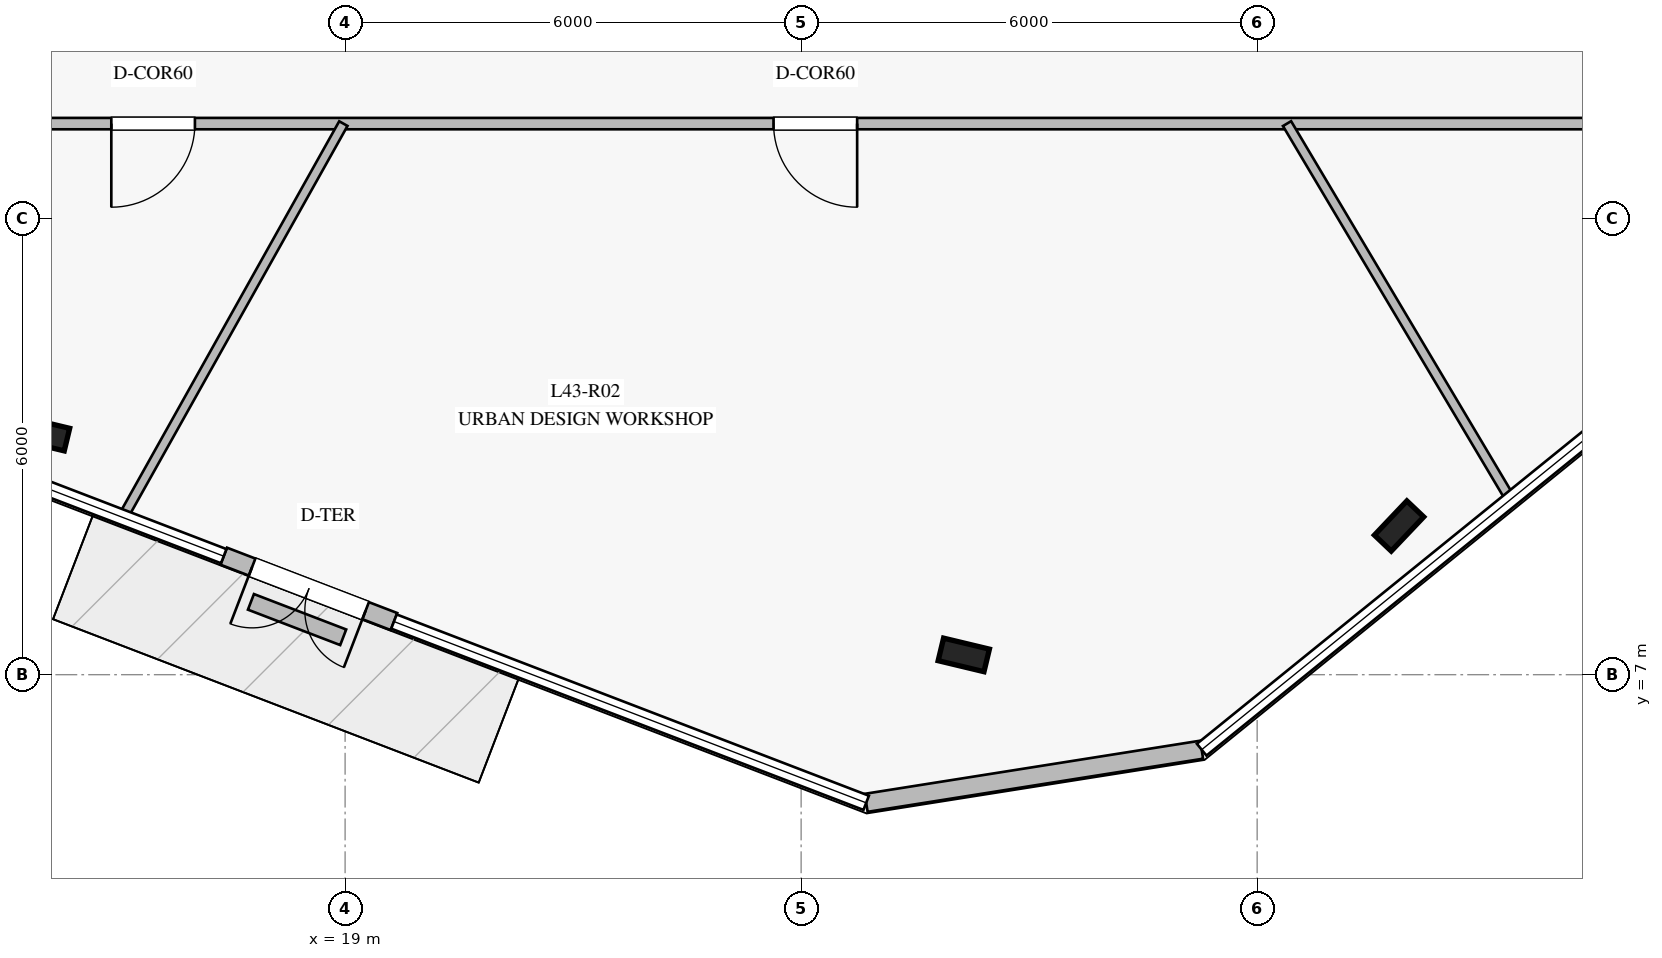
"""IFC4 building model, lengths in metres.
Left out: names, types, materials, properties, quantities, classifications, styles, units other than length and angle.
Written with IfcOpenShell. Run it as: python <this file> out.ifc"""

import sys

from ifc_helpers import new_model, si_unit, direction, frame, frame_2d, origin, origin_2d, place, context, subcontext, project, spatial, rectangle, i_section, extrude, element, fill, save


model = new_model("IFC4")
c1 = context("Model", 3, precision=1e-05, world=origin(), true_north=direction((0.0, 1.0)))
c2 = subcontext(c1, "Body", "Model", "MODEL_VIEW")
j1 = project(units=[si_unit("LENGTHUNIT", "METRE"), si_unit("PLANEANGLEUNIT", "RADIAN")], contexts=[c1])
p1 = place(None, origin())
s1 = spatial("IfcSite", under=j1, at=p1, CompositionType="ELEMENT")
p2 = place(p1, origin())
s2 = spatial("IfcBuilding", under=s1, at=p2, CompositionType="ELEMENT")
p3 = place(p2, frame((0.0, 0.0, 180.8)))
s3 = spatial("IfcBuildingStorey", under=s2, at=p3, CompositionType="ELEMENT", Elevation=180.8)
for number, where, z_axis, x_axis in (
    (1, (15.039, 10.165, 0.0), (0.0, 0.0, 1.0), (-0.972, 0.233, 0.0)),
    (2, (27.14, 7.26, 0.0), (0.0, 0.0, 1.0), (-0.972, 0.233, 0.0)),
    (3, (32.867, 8.956, 0.0), (0.0, 0.0, 1.0), (0.688, 0.725, 0.0)),
):
    element("IfcColumn", number, at=place(p3, frame(where, z_axis=z_axis, x_axis=x_axis)), inside=s3, PredefinedType="COLUMN", context=c2, shape_type="SweptSolid", body=[
        extrude(i_section(OverallWidth=0.305, OverallDepth=0.62, WebThickness=0.021, FlangeThickness=0.04, at=origin_2d()), origin(), (0.0, 0.0, 1.0), 4.0),
    ])
p4 = place(p3, frame((17.403, 8.559, 0.0), z_axis=(0.0, 0.0, 1.0), x_axis=(0.933544764029, -0.358460839638, 0.0)))
e4 = element("IfcWall", 4, at=p4, inside=s3, PredefinedType="STANDARD", context=c2, shape_type="SweptSolid", body=[
    extrude(rectangle(XDim=2.399, YDim=0.24, at=frame_2d((1.2, 0.0))), origin(), (0.0, 0.0, 1.0), 3.78),
])
p5 = place(p4, frame((0.4, 0.0, 0.0)))
e5 = element("IfcOpeningElement", 5, at=p5, cuts=e4, PredefinedType="OPENING", context=c2, shape_type="SweptSolid", body=[
    extrude(rectangle(XDim=1.6, YDim=2.25, at=frame_2d((0.8, 1.125))), frame((0.0, 0.13, 0.0), z_axis=(0.0, -1.0, 0.0), x_axis=(1.0, 0.0, 0.0)), (0.0, 0.0, 1.0), 0.26),
])
p6 = place(p3, frame((25.856, 5.314, 0.0), z_axis=(0.0, 0.0, 1.0), x_axis=(0.987693325828, 0.156402986275, 0.0)))
e6 = element("IfcWall", 6, at=p6, inside=s3, PredefinedType="STANDARD", context=c2, shape_type="SweptSolid", body=[
    extrude(rectangle(XDim=4.469, YDim=0.24, at=frame_2d((2.234, 0.0))), origin(), (0.0, 0.0, 1.0), 3.78),
])
p7 = place(p3, frame((17.761, 7.958, 0.0), z_axis=(0.0, 0.0, 1.0), x_axis=(0.933577653273, -0.358375173959, 0.0)))
e7 = element("IfcWall", 7, at=p7, inside=s3, PredefinedType="USERDEFINED", context=c2, shape_type="SweptSolid", body=[
    extrude(rectangle(XDim=1.301, YDim=0.22, at=frame_2d((0.65, 0.0))), origin(), (0.0, 0.0, 1.0), 0.4),
])
p8 = place(p3, frame((36.35, 14.25, 0.0), z_axis=(0.0, 0.0, 1.0), x_axis=(-1.0, 0.0, 0.0)))
e8 = element("IfcWall", 8, at=p8, inside=s3, PredefinedType="PARTITIONING", context=c2, shape_type="SweptSolid", body=[
    extrude(rectangle(XDim=22.7, YDim=0.15, at=frame_2d((11.35, 0.0))), origin(), (0.0, 0.0, 1.0), 3.05),
])
p9 = place(p8, frame((19.326, 0.0, 0.0)))
e9 = element("IfcOpeningElement", 9, at=p9, cuts=e8, PredefinedType="OPENING", context=c2, shape_type="SweptSolid", body=[
    extrude(rectangle(XDim=1.1, YDim=2.2, at=frame_2d((0.55, 1.1))), frame((0.0, 0.085, 0.0), z_axis=(0.0, -1.0, 0.0), x_axis=(1.0, 0.0, 0.0)), (0.0, 0.0, 1.0), 0.17),
])
p10 = place(p8, frame((10.613, 0.0, 0.0)))
e10 = element("IfcOpeningElement", 10, at=p10, cuts=e8, PredefinedType="OPENING", context=c2, shape_type="SweptSolid", body=[
    extrude(rectangle(XDim=1.1, YDim=2.2, at=frame_2d((0.55, 1.1))), frame((0.0, 0.085, 0.0), z_axis=(0.0, -1.0, 0.0), x_axis=(1.0, 0.0, 0.0)), (0.0, 0.0, 1.0), 0.17),
])
p11 = place(p3, frame((18.977, 14.25, 0.0), z_axis=(0.0, 0.0, 1.0), x_axis=(-0.488671153829, -0.872468052948, 0.0)))
e11 = element("IfcWall", 11, at=p11, inside=s3, PredefinedType="PARTITIONING", context=c2, shape_type="SweptSolid", body=[
    extrude(rectangle(XDim=5.922, YDim=0.125, at=frame_2d((2.961, 0.0))), origin(), (0.0, 0.0, 1.0), 3.05),
])
p12 = place(p3, frame((31.393, 14.25, 0.0), z_axis=(0.0, 0.0, 1.0), x_axis=(0.511200293468, -0.85946161052, 0.0)))
e12 = element("IfcWall", 12, at=p12, inside=s3, PredefinedType="PARTITIONING", context=c2, shape_type="SweptSolid", body=[
    extrude(rectangle(XDim=5.737, YDim=0.125, at=frame_2d((2.869, 0.0))), origin(), (0.0, 0.0, 1.0), 3.18),
])
p13 = place(p5, frame((1.6, 0.0, 0.0), z_axis=(0.0, 0.0, 1.0), x_axis=(-1.0, 0.0, 0.0)))
e13 = element("IfcDoor", 13, at=p13, inside=s3, OperationType="DOUBLE_DOOR_SINGLE_SWING", PredefinedType="DOOR", context=c2, shape_type="SweptSolid", body=[
    extrude(rectangle(XDim=1.6, YDim=2.25, at=frame_2d((0.8, 1.125))), frame((0.0, 0.025, 0.0), z_axis=(0.0, -1.0, 0.0), x_axis=(1.0, 0.0, 0.0)), (0.0, 0.0, 1.0), 0.05),
])
fill(e5, e13)
p14 = place(p9, origin())
e14 = element("IfcDoor", 14, at=p14, inside=s3, OperationType="SINGLE_SWING_RIGHT", PredefinedType="DOOR", context=c2, shape_type="SweptSolid", body=[
    extrude(rectangle(XDim=1.1, YDim=2.2, at=frame_2d((0.55, 1.1))), frame((0.0, 0.025, 0.0), z_axis=(0.0, -1.0, 0.0), x_axis=(1.0, 0.0, 0.0)), (0.0, 0.0, 1.0), 0.05),
])
fill(e9, e14)
p15 = place(p10, origin())
e15 = element("IfcDoor", 15, at=p15, inside=s3, OperationType="SINGLE_SWING_LEFT", PredefinedType="DOOR", context=c2, shape_type="SweptSolid", body=[
    extrude(rectangle(XDim=1.1, YDim=2.2, at=frame_2d((0.55, 1.1))), frame((0.0, 0.025, 0.0), z_axis=(0.0, -1.0, 0.0), x_axis=(1.0, 0.0, 0.0)), (0.0, 0.0, 1.0), 0.05),
])
fill(e10, e15)
save(model, sys.argv[1])
